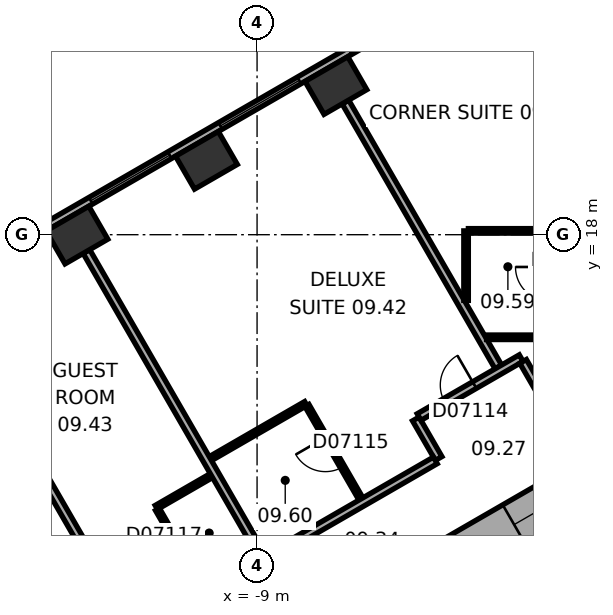
"""IFC4 building model, lengths in metres.
Left out: names, types, materials, properties, quantities, classifications, styles, units other than length and angle.
Written with IfcOpenShell. Run it as: python <this file> out.ifc"""

import sys

from ifc_helpers import new_model, si_unit, direction, frame, frame_2d, origin, origin_2d, place, context, subcontext, project, spatial, rectangle, extrude, element, fill, save


model = new_model("IFC4")
c1 = context("Model", 3, precision=1e-05, world=origin(), true_north=direction((0.0, 1.0)))
c2 = subcontext(c1, "Body", "Model", "MODEL_VIEW")
j1 = project(units=[si_unit("LENGTHUNIT", "METRE"), si_unit("PLANEANGLEUNIT", "RADIAN")], contexts=[c1])
p1 = place(None, origin())
s1 = spatial("IfcSite", under=j1, at=p1, CompositionType="ELEMENT")
p2 = place(p1, origin())
s2 = spatial("IfcBuilding", under=s1, at=p2, CompositionType="ELEMENT")
p3 = place(p2, frame((0.0, 0.0, 50.6)))
s3 = spatial("IfcBuildingStorey", under=s2, at=p3, CompositionType="ELEMENT", Elevation=50.6)
for number, where, z_axis, x_axis in (
    (1, (-6.926, 21.925, 0.0), (0.0, 0.0, 1.0), (-0.866, -0.5, 0.0)),
    (2, (-10.333, 19.957, 0.0), (0.0, 0.0, 1.0), (-0.866, -0.5, 0.0)),
    (3, (-13.74, 17.99, 0.0), (0.0, 0.0, 1.0), (-0.866, -0.5, 0.0)),
):
    element("IfcColumn", number, at=place(p3, frame(where, z_axis=z_axis, x_axis=x_axis)), inside=s3, PredefinedType="COLUMN", context=c2, shape_type="SweptSolid", body=[
        extrude(rectangle(XDim=1.3, YDim=1.0, at=origin_2d()), origin(), (0.0, 0.0, 1.0), 3.3),
    ])
p4 = place(p3, frame((0.3, 11.836, 0.0), z_axis=(0.0, 0.0, 1.0), x_axis=(-0.866021384402, -0.500006961711, 0.0)))
e4 = element("IfcWall", 4, at=p4, inside=s3, PredefinedType="SHEAR", context=c2, shape_type="SweptSolid", body=[
    extrude(rectangle(XDim=12.355, YDim=1.2, at=frame_2d((6.178, 0.0))), origin(), (0.0, 0.0, 1.0), 3.3),
])
p5 = place(p4, frame((6.378, 0.0, 0.0)))
e5 = element("IfcOpeningElement", 5, at=p5, cuts=e4, PredefinedType="OPENING", context=c2, shape_type="SweptSolid", body=[
    extrude(rectangle(XDim=1.5, YDim=2.1, at=frame_2d((0.75, 1.05))), frame((0.0, 0.61, 0.0), z_axis=(0.0, -1.0, 0.0), x_axis=(1.0, 0.0, 0.0)), (0.0, 0.0, 1.0), 1.22),
])
p6 = place(p4, frame((1.828, 0.0, 0.0)))
e6 = element("IfcOpeningElement", 6, at=p6, cuts=e4, PredefinedType="OPENING", context=c2, shape_type="SweptSolid", body=[
    extrude(rectangle(XDim=1.1, YDim=2.1, at=frame_2d((0.55, 1.05))), frame((0.0, 0.61, 0.0), z_axis=(0.0, -1.0, 0.0), x_axis=(1.0, 0.0, 0.0)), (0.0, 0.0, 1.0), 1.22),
])
p7 = place(p3, frame((-3.136, 24.805, 0.0), z_axis=(0.0, 0.0, 1.0), x_axis=(-0.866028291626, -0.499994998079, 0.0)))
e7 = element("IfcWall", 7, at=p7, inside=s3, PredefinedType="STANDARD", context=c2, shape_type="SweptSolid", body=[
    extrude(rectangle(XDim=21.246, YDim=0.2, at=frame_2d((10.623, 0.0))), origin(), (0.0, 0.0, 1.0), 3.3),
])
p8 = place(p7, frame((1.555, 0.0, 0.8)))
e8 = element("IfcOpeningElement", 8, at=p8, cuts=e7, PredefinedType="OPENING", context=c2, shape_type="SweptSolid", body=[
    extrude(rectangle(XDim=2.4, YDim=1.7, at=frame_2d((1.2, 0.85))), frame((0.0, 0.11, 0.0), z_axis=(0.0, -1.0, 0.0), x_axis=(1.0, 0.0, 0.0)), (0.0, 0.0, 1.0), 0.22),
])
p9 = place(p7, frame((5.489, 0.0, 0.8)))
e9 = element("IfcOpeningElement", 9, at=p9, cuts=e7, PredefinedType="OPENING", context=c2, shape_type="SweptSolid", body=[
    extrude(rectangle(XDim=2.4, YDim=1.7, at=frame_2d((1.2, 0.85))), frame((0.0, 0.11, 0.0), z_axis=(0.0, -1.0, 0.0), x_axis=(1.0, 0.0, 0.0)), (0.0, 0.0, 1.0), 0.22),
])
p10 = place(p7, frame((9.424, 0.0, 0.8)))
e10 = element("IfcOpeningElement", 10, at=p10, cuts=e7, PredefinedType="OPENING", context=c2, shape_type="SweptSolid", body=[
    extrude(rectangle(XDim=2.4, YDim=1.7, at=frame_2d((1.2, 0.85))), frame((0.0, 0.11, 0.0), z_axis=(0.0, -1.0, 0.0), x_axis=(1.0, 0.0, 0.0)), (0.0, 0.0, 1.0), 0.22),
])
p11 = place(p7, frame((13.358, 0.0, 0.8)))
e11 = element("IfcOpeningElement", 11, at=p11, cuts=e7, PredefinedType="OPENING", context=c2, shape_type="SweptSolid", body=[
    extrude(rectangle(XDim=2.4, YDim=1.7, at=frame_2d((1.2, 0.85))), frame((0.0, 0.11, 0.0), z_axis=(0.0, -1.0, 0.0), x_axis=(1.0, 0.0, 0.0)), (0.0, 0.0, 1.0), 0.22),
])
p12 = place(p7, frame((17.293, 0.0, 0.8)))
e12 = element("IfcOpeningElement", 12, at=p12, cuts=e7, PredefinedType="OPENING", context=c2, shape_type="SweptSolid", body=[
    extrude(rectangle(XDim=2.4, YDim=1.7, at=frame_2d((1.2, 0.85))), frame((0.0, 0.11, 0.0), z_axis=(0.0, -1.0, 0.0), x_axis=(1.0, 0.0, 0.0)), (0.0, 0.0, 1.0), 0.22),
])
p13 = place(p3, frame((-16.898, 15.59, 0.0), z_axis=(0.0, 0.0, 1.0), x_axis=(0.500023458698, -0.866011859475, 0.0)))
e13 = element("IfcWall", 13, at=p13, inside=s3, PredefinedType="PARTITIONING", context=c2, shape_type="SweptSolid", body=[
    extrude(rectangle(XDim=9.572, YDim=0.2, at=frame_2d((4.786, 0.0))), origin(), (0.0, 0.0, 1.0), 3.05),
])
p14 = place(p3, frame((-11.651, 10.825, 0.0), z_axis=(0.0, 0.0, 1.0), x_axis=(0.865998477143, 0.500046635412, 0.0)))
e14 = element("IfcWall", 14, at=p14, inside=s3, PredefinedType="PARTITIONING", context=c2, shape_type="SweptSolid", body=[
    extrude(rectangle(XDim=1.673, YDim=0.12, at=frame_2d((0.836, 0.0))), origin(), (0.0, 0.0, 1.0), 3.05),
])
p15 = place(p3, frame((-10.401, 8.66, 0.0), z_axis=(0.0, 0.0, 1.0), x_axis=(-0.500077547548, 0.865980627057, 0.0)))
e15 = element("IfcWall", 15, at=p15, inside=s3, PredefinedType="PARTITIONING", context=c2, shape_type="SweptSolid", body=[
    extrude(rectangle(XDim=2.44, YDim=0.12, at=frame_2d((1.22, 0.0))), origin(), (0.0, 0.0, 1.0), 3.05),
])
p16 = place(p15, frame((0.77, 0.0, 0.0)))
e16 = element("IfcOpeningElement", 16, at=p16, cuts=e15, PredefinedType="OPENING", context=c2, shape_type="SweptSolid", body=[
    extrude(rectangle(XDim=0.9, YDim=2.1, at=frame_2d((0.45, 1.05))), frame((0.0, 0.07, 0.0), z_axis=(0.0, -1.0, 0.0), x_axis=(1.0, 0.0, 0.0)), (0.0, 0.0, 1.0), 0.14),
])
p17 = place(p3, frame((-10.229, 12.108, 0.0), z_axis=(0.0, 0.0, 1.0), x_axis=(0.866032775405, 0.499987231761, 0.0)))
e17 = element("IfcWall", 17, at=p17, inside=s3, PredefinedType="PARTITIONING", context=c2, shape_type="SweptSolid", body=[
    extrude(rectangle(XDim=2.9, YDim=0.12, at=frame_2d((1.45, 0.0))), origin(), (0.0, 0.0, 1.0), 3.05),
])
p18 = place(p3, frame((-7.865, 7.814, 0.0), z_axis=(0.0, 0.0, 1.0), x_axis=(-0.500004234368, 0.866022959057, 0.0)))
e18 = element("IfcWall", 18, at=p18, inside=s3, PredefinedType="PARTITIONING", context=c2, shape_type="SweptSolid", body=[
    extrude(rectangle(XDim=11.25, YDim=0.2, at=frame_2d((5.625, 0.0))), origin(), (0.0, 0.0, 1.0), 3.05),
])
p19 = place(p18, frame((0.5, 0.0, 0.0)))
e19 = element("IfcOpeningElement", 19, at=p19, cuts=e18, PredefinedType="OPENING", context=c2, shape_type="SweptSolid", body=[
    extrude(rectangle(XDim=0.9, YDim=2.1, at=frame_2d((0.45, 1.05))), frame((0.0, 0.11, 0.0), z_axis=(0.0, -1.0, 0.0), x_axis=(1.0, 0.0, 0.0)), (0.0, 0.0, 1.0), 0.22),
])
p20 = place(p3, frame((-7.687, 13.506, 0.0), z_axis=(0.0, 0.0, 1.0), x_axis=(0.499985389037, -0.866033839264, 0.0)))
e20 = element("IfcWall", 20, at=p20, inside=s3, PredefinedType="PARTITIONING", context=c2, shape_type="SweptSolid", body=[
    extrude(rectangle(XDim=2.84, YDim=0.12, at=frame_2d((1.42, 0.0))), origin(), (0.0, 0.0, 1.0), 2.6),
])
p21 = place(p20, frame((0.97, 0.0, 0.0)))
e21 = element("IfcOpeningElement", 21, at=p21, cuts=e20, PredefinedType="OPENING", context=c2, shape_type="SweptSolid", body=[
    extrude(rectangle(XDim=0.9, YDim=2.1, at=frame_2d((0.45, 1.05))), frame((0.0, 0.07, 0.0), z_axis=(0.0, -1.0, 0.0), x_axis=(1.0, 0.0, 0.0)), (0.0, 0.0, 1.0), 0.14),
])
p22 = place(p3, frame((-6.676, 21.492, 0.0), z_axis=(0.0, 0.0, 1.0), x_axis=(0.500011263043, -0.866018900966, 0.0)))
e22 = element("IfcWall", 22, at=p22, inside=s3, PredefinedType="PARTITIONING", context=c2, shape_type="SweptSolid", body=[
    extrude(rectangle(XDim=8.049, YDim=0.2, at=frame_2d((4.024, 0.0))), origin(), (0.0, 0.0, 1.0), 3.05),
])
p23 = place(p3, frame((-4.823, 13.152, 0.0), z_axis=(0.0, 0.0, 1.0), x_axis=(0.499986357472, -0.866033280158, 0.0)))
e23 = element("IfcWall", 23, at=p23, inside=s3, PredefinedType="PARTITIONING", context=c2, shape_type="SweptSolid", body=[
    extrude(rectangle(XDim=1.201, YDim=0.2, at=frame_2d((0.601, 0.0))), origin(), (0.0, 0.0, 1.0), 3.05),
])
p24 = place(p3, frame((-4.309, 12.061, 0.0), z_axis=(0.0, 0.0, 1.0), x_axis=(-0.866020679205, -0.500008183122, 0.0)))
e24 = element("IfcWall", 24, at=p24, inside=s3, PredefinedType="PARTITIONING", context=c2, shape_type="SweptSolid", body=[
    extrude(rectangle(XDim=5.104, YDim=0.2, at=frame_2d((2.552, 0.0))), origin(), (0.0, 0.0, 1.0), 3.05),
])
p25 = place(p3, frame((-3.5, 16.271, 0.0), z_axis=(0.0, 0.0, 1.0), x_axis=(0.0, 1.0, 0.0)))
e25 = element("IfcWall", 25, at=p25, inside=s3, PredefinedType="PARTITIONING", context=c2, shape_type="SweptSolid", body=[
    extrude(rectangle(XDim=1.829, YDim=0.12, at=frame_2d((0.915, 0.0))), origin(), (0.0, 0.0, 1.0), 3.05),
])
p26 = place(p3, frame((-3.44, 18.101, 0.0), z_axis=(0.0, 0.0, 1.0), x_axis=(1.0, 0.0, 0.0)))
e26 = element("IfcWall", 26, at=p26, inside=s3, PredefinedType="PARTITIONING", context=c2, shape_type="SweptSolid", body=[
    extrude(rectangle(XDim=2.14, YDim=0.12, at=frame_2d((1.07, 0.0))), origin(), (0.0, 0.0, 1.0), 3.05),
])
p27 = place(p3, frame((-2.05, 14.752, 0.0), z_axis=(0.0, 0.0, 1.0), x_axis=(-0.866030936828, -0.499990416364, 0.0)))
e27 = element("IfcWall", 27, at=p27, inside=s3, PredefinedType="PARTITIONING", context=c2, shape_type="SweptSolid", body=[
    extrude(rectangle(XDim=3.102, YDim=0.2, at=frame_2d((1.551, 0.0))), origin(), (0.0, 0.0, 1.0), 3.05),
])
p28 = place(p27, frame((1.419, 0.0, 0.0)))
e28 = element("IfcOpeningElement", 28, at=p28, cuts=e27, PredefinedType="OPENING", context=c2, shape_type="SweptSolid", body=[
    extrude(rectangle(XDim=0.9, YDim=2.1, at=frame_2d((0.45, 1.05))), frame((0.0, 0.11, 0.0), z_axis=(0.0, -1.0, 0.0), x_axis=(1.0, 0.0, 0.0)), (0.0, 0.0, 1.0), 0.22),
])
p29 = place(p3, frame((-1.449, 13.712, 0.0), z_axis=(0.0, 0.0, 1.0), x_axis=(-0.499978356969, 0.866037899034, 0.0)))
e29 = element("IfcWall", 29, at=p29, inside=s3, PredefinedType="PARTITIONING", context=c2, shape_type="SweptSolid", body=[
    extrude(rectangle(XDim=1.101, YDim=0.2, at=frame_2d((0.551, 0.0))), origin(), (0.0, 0.0, 1.0), 3.05),
])
p30 = place(p3, frame((-1.3, 15.301, 0.0), z_axis=(0.0, 0.0, 1.0), x_axis=(-1.0, 0.0, 0.0)))
e30 = element("IfcWall", 30, at=p30, inside=s3, PredefinedType="PARTITIONING", context=c2, shape_type="SweptSolid", body=[
    extrude(rectangle(XDim=1.661, YDim=0.12, at=frame_2d((0.831, 0.0))), origin(), (0.0, 0.0, 1.0), 3.05),
])
p31 = place(p9, origin())
e31 = element("IfcWindow", 31, at=p31, inside=s3, PartitioningType="SINGLE_PANEL", PredefinedType="WINDOW", context=c2, shape_type="SweptSolid", body=[
    extrude(rectangle(XDim=2.4, YDim=1.7, at=frame_2d((1.2, 0.85))), frame((0.0, 0.03, 0.0), z_axis=(0.0, -1.0, 0.0), x_axis=(1.0, 0.0, 0.0)), (0.0, 0.0, 1.0), 0.06),
])
fill(e9, e31)
p32 = place(p10, origin())
e32 = element("IfcWindow", 32, at=p32, inside=s3, PartitioningType="SINGLE_PANEL", PredefinedType="WINDOW", context=c2, shape_type="SweptSolid", body=[
    extrude(rectangle(XDim=2.4, YDim=1.7, at=frame_2d((1.2, 0.85))), frame((0.0, 0.03, 0.0), z_axis=(0.0, -1.0, 0.0), x_axis=(1.0, 0.0, 0.0)), (0.0, 0.0, 1.0), 0.06),
])
fill(e10, e32)
p33 = place(p6, origin())
e33 = element("IfcDoor", 33, at=p33, inside=s3, OperationType="DOUBLE_DOOR_SLIDING", PredefinedType="DOOR", context=c2, shape_type="SweptSolid", body=[
    extrude(rectangle(XDim=1.1, YDim=2.1, at=frame_2d((0.55, 1.05))), frame((0.0, 0.025, 0.0), z_axis=(0.0, -1.0, 0.0), x_axis=(1.0, 0.0, 0.0)), (0.0, 0.0, 1.0), 0.05),
])
fill(e6, e33)
p34 = place(p28, origin())
e34 = element("IfcDoor", 34, at=p34, inside=s3, OperationType="SINGLE_SWING_LEFT", PredefinedType="DOOR", context=c2, shape_type="SweptSolid", body=[
    extrude(rectangle(XDim=0.9, YDim=2.1, at=frame_2d((0.45, 1.05))), frame((0.0, 0.025, 0.0), z_axis=(0.0, -1.0, 0.0), x_axis=(1.0, 0.0, 0.0)), (0.0, 0.0, 1.0), 0.05),
])
fill(e28, e34)
p35 = place(p21, origin())
e35 = element("IfcDoor", 35, at=p35, inside=s3, OperationType="SINGLE_SWING_LEFT", PredefinedType="DOOR", context=c2, shape_type="SweptSolid", body=[
    extrude(rectangle(XDim=0.9, YDim=2.1, at=frame_2d((0.45, 1.05))), frame((0.0, 0.025, 0.0), z_axis=(0.0, -1.0, 0.0), x_axis=(1.0, 0.0, 0.0)), (0.0, 0.0, 1.0), 0.05),
])
fill(e21, e35)
p36 = place(p16, origin())
e36 = element("IfcDoor", 36, at=p36, inside=s3, OperationType="SINGLE_SWING_LEFT", PredefinedType="DOOR", context=c2, shape_type="SweptSolid", body=[
    extrude(rectangle(XDim=0.9, YDim=2.1, at=frame_2d((0.45, 1.05))), frame((0.0, 0.025, 0.0), z_axis=(0.0, -1.0, 0.0), x_axis=(1.0, 0.0, 0.0)), (0.0, 0.0, 1.0), 0.05),
])
fill(e16, e36)
save(model, sys.argv[1])
